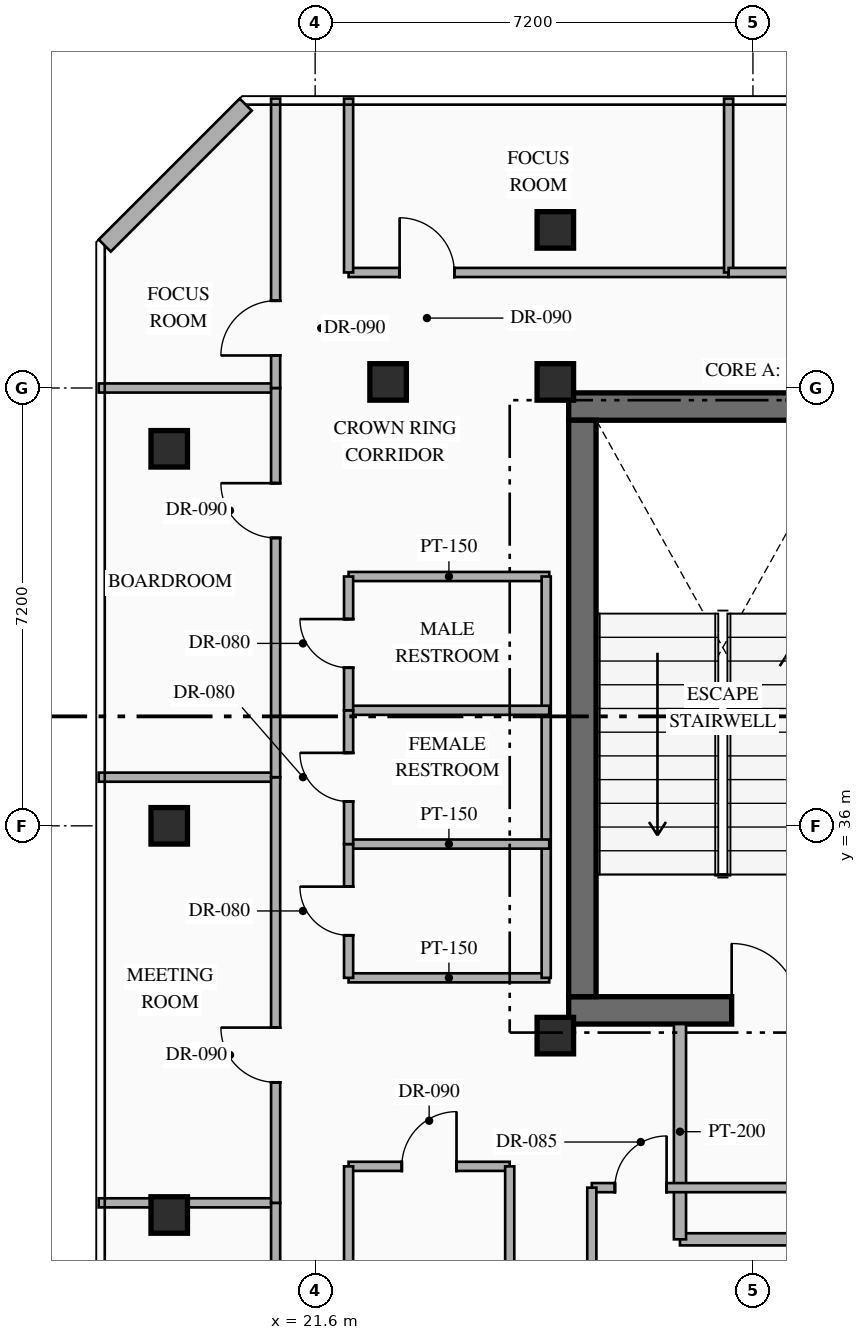
"""IFC4 building model, lengths in metres.
Left out: names, types, materials, properties, quantities, classifications, styles, units other than length and angle.
Written with IfcOpenShell. Run it as: python <this file> out.ifc"""

import sys

from ifc_helpers import new_model, si_unit, direction, frame, frame_2d, origin, origin_2d, place, context, subcontext, project, spatial, rectangle, hollow_rectangle, extrude, element, fill, save


model = new_model("IFC4")
c1 = context("Model", 3, precision=1e-05, world=origin(), true_north=direction((0.0, 1.0)))
c2 = subcontext(c1, "Body", "Model", "MODEL_VIEW")
j1 = project(units=[si_unit("LENGTHUNIT", "METRE"), si_unit("PLANEANGLEUNIT", "RADIAN")], contexts=[c1])
p1 = place(None, origin())
s1 = spatial("IfcSite", under=j1, at=p1, CompositionType="ELEMENT")
p2 = place(p1, origin())
s2 = spatial("IfcBuilding", under=s1, at=p2, CompositionType="ELEMENT")
p3 = place(p2, frame((0.0, 0.0, 269.95)))
s3 = spatial("IfcBuildingStorey", under=s2, at=p3, CompositionType="ELEMENT", Elevation=269.95)
p4 = place(p3, frame((25.77, 32.965, 0.0), z_axis=(0.0, 0.0, 1.0), x_axis=(1.0, 0.0, 0.0)))
e1 = element("IfcWall", 1, at=p4, inside=s3, PredefinedType="SHEAR", context=c2, shape_type="SweptSolid", body=[
    extrude(rectangle(XDim=7.48, YDim=0.45, at=frame_2d((3.74, 0.0))), origin(), (0.0, 0.0, 1.0), 4.0),
])
p5 = place(p4, frame((2.68, 0.0, 0.0)))
e2 = element("IfcOpeningElement", 2, at=p5, cuts=e1, PredefinedType="OPENING", context=c2, shape_type="SweptSolid", body=[
    extrude(rectangle(XDim=1.1, YDim=2.2, at=frame_2d((0.55, 1.1))), frame((0.0, 0.235, 0.0), z_axis=(0.0, -1.0, 0.0), x_axis=(1.0, 0.0, 0.0)), (0.0, 0.0, 1.0), 0.47),
])
p6 = place(p4, frame((5.43, 0.0, 0.0)))
e3 = element("IfcOpeningElement", 3, at=p6, cuts=e1, PredefinedType="OPENING", context=c2, shape_type="SweptSolid", body=[
    extrude(rectangle(XDim=1.1, YDim=2.15, at=frame_2d((0.55, 1.075))), frame((0.0, 0.235, 0.0), z_axis=(0.0, -1.0, 0.0), x_axis=(1.0, 0.0, 0.0)), (0.0, 0.0, 1.0), 0.47),
])
p7 = place(p3, frame((25.77, 42.895, 0.0), z_axis=(0.0, 0.0, 1.0), x_axis=(1.0, 0.0, 0.0)))
e4 = element("IfcWall", 4, at=p7, inside=s3, PredefinedType="SHEAR", context=c2, shape_type="SweptSolid", body=[
    extrude(rectangle(XDim=7.48, YDim=0.45, at=frame_2d((3.74, 0.0))), origin(), (0.0, 0.0, 1.0), 4.0),
])
p8 = place(p3, frame((25.995, 33.19, 0.0), z_axis=(0.0, 0.0, 1.0), x_axis=(0.0, 1.0, 0.0)))
e5 = element("IfcWall", 5, at=p8, inside=s3, PredefinedType="SHEAR", context=c2, shape_type="SweptSolid", body=[
    extrude(rectangle(XDim=9.48, YDim=0.45, at=frame_2d((4.74, 0.0))), origin(), (0.0, 0.0, 1.0), 4.0),
])
for number, where, z_axis, x_axis in (
    (6, (25.55, 32.55, 0.0), (0.0, 0.0, 1.0), (1.0, 0.0, 0.0)),
    (7, (25.55, 43.3, 0.0), (0.0, 0.0, 1.0), (1.0, 0.0, 0.0)),
    (8, (25.55, 45.8, 0.0), (0.0, 0.0, 1.0), (1.0, 0.0, 0.0)),
):
    element("IfcColumn", number, at=place(p3, frame(where, z_axis=z_axis, x_axis=x_axis)), inside=s3, PredefinedType="COLUMN", context=c2, shape_type="SweptSolid", body=[
        extrude(hollow_rectangle(XDim=0.6, YDim=0.6, WallThickness=0.025, at=origin_2d()), origin(), (0.0, 0.0, 1.0), 4.0),
    ])
for number, where, z_axis, x_axis in (
    (9, (19.2, 29.6, 0.0), (0.0, 0.0, 1.0), (1.0, 0.0, 0.0)),
    (10, (19.2, 42.2, 0.0), (0.0, 0.0, 1.0), (1.0, 0.0, 0.0)),
):
    element("IfcColumn", number, at=place(p3, frame(where, z_axis=z_axis, x_axis=x_axis)), inside=s3, PredefinedType="COLUMN", context=c2, shape_type="SweptSolid", body=[
        extrude(hollow_rectangle(XDim=0.6, YDim=0.6, WallThickness=0.025, at=origin_2d()), origin(), (0.0, 0.0, 1.0), 3.718),
    ])
p9 = place(p3, frame((22.8, 43.3, 0.0), z_axis=(0.0, 0.0, 1.0), x_axis=(1.0, 0.0, 0.0)))
e11 = element("IfcColumn", 11, at=p9, inside=s3, PredefinedType="COLUMN", context=c2, shape_type="SweptSolid", body=[
    extrude(hollow_rectangle(XDim=0.6, YDim=0.6, WallThickness=0.025, at=origin_2d()), origin(), (0.0, 0.0, 1.0), 4.0),
])
p10 = place(p3, frame((19.2, 36.0, 0.0), z_axis=(0.0, 0.0, 1.0), x_axis=(1.0, 0.0, 0.0)))
e12 = element("IfcColumn", 12, at=p10, inside=s3, PredefinedType="COLUMN", context=c2, shape_type="SweptSolid", body=[
    extrude(hollow_rectangle(XDim=0.6, YDim=0.6, WallThickness=0.025, at=origin_2d()), origin(), (0.0, 0.0, 1.0), 3.718),
])
p11 = place(p3, frame((18.14, 45.542, 0.0), z_axis=(0.0, 0.0, 1.0), x_axis=(0.707106781187, 0.707106781187, 0.0)))
e13 = element("IfcWall", 13, at=p11, inside=s3, PredefinedType="STANDARD", context=c2, shape_type="SweptSolid", body=[
    extrude(rectangle(XDim=3.278, YDim=0.28, at=frame_2d((1.639, 0.0))), origin(), (0.0, 0.0, 1.0), 3.74),
])
p12 = place(p3, frame((27.6, 29.2, 0.0), z_axis=(0.0, 0.0, 1.0), x_axis=(1.0, 0.0, 0.0)))
e14 = element("IfcWall", 14, at=p12, inside=s3, PredefinedType="STANDARD", context=c2, shape_type="SweptSolid", body=[
    extrude(rectangle(XDim=5.15, YDim=0.2, at=frame_2d((2.575, 0.0))), origin(), (0.0, 0.0, 1.0), 3.74),
])
p13 = place(p3, frame((27.6, 29.2, 0.0), z_axis=(0.0, 0.0, 1.0), x_axis=(0.0, 1.0, 0.0)))
e15 = element("IfcWall", 15, at=p13, inside=s3, PredefinedType="STANDARD", context=c2, shape_type="SweptSolid", body=[
    extrude(rectangle(XDim=3.54, YDim=0.2, at=frame_2d((1.77, 0.0))), origin(), (0.0, 0.0, 1.0), 3.74),
])
for number, where, z_axis, x_axis in (
    (16, (22.15, 33.5, 0.0), (0.0, 0.0, 1.0), (1.0, 0.0, 0.0)),
    (17, (22.15, 40.1, 0.0), (0.0, 0.0, 1.0), (1.0, 0.0, 0.0)),
):
    element("IfcWall", number, at=place(p3, frame(where, z_axis=z_axis, x_axis=x_axis)), inside=s3, PredefinedType="PARTITIONING", context=c2, shape_type="SweptSolid", body=[
        extrude(rectangle(XDim=3.3, YDim=0.15, at=frame_2d((1.65, 0.0))), origin(), (0.0, 0.0, 1.0), 3.74),
    ])
p14 = place(p3, frame((25.4, 33.5, 0.0), z_axis=(0.0, 0.0, 1.0), x_axis=(0.0, 1.0, 0.0)))
e18 = element("IfcWall", 18, at=p14, inside=s3, PredefinedType="PARTITIONING", context=c2, shape_type="SweptSolid", body=[
    extrude(rectangle(XDim=6.6, YDim=0.15, at=frame_2d((3.3, 0.0))), origin(), (0.0, 0.0, 1.0), 3.74),
])
for number, where, z_axis, x_axis in (
    (19, (22.15, 35.7, 0.0), (0.0, 0.0, 1.0), (1.0, 0.0, 0.0)),
    (20, (22.15, 37.9, 0.0), (0.0, 0.0, 1.0), (1.0, 0.0, 0.0)),
):
    element("IfcWall", number, at=place(p3, frame(where, z_axis=z_axis, x_axis=x_axis)), inside=s3, PredefinedType="PARTITIONING", context=c2, shape_type="SweptSolid", body=[
        extrude(rectangle(XDim=3.3, YDim=0.15, at=frame_2d((1.65, 0.0))), origin(), (0.0, 0.0, 1.0), 3.74),
    ])
p15 = place(p3, frame((22.15, 33.5, 0.0), z_axis=(0.0, 0.0, 1.0), x_axis=(0.0, 1.0, 0.0)))
e21 = element("IfcWall", 21, at=p15, inside=s3, PredefinedType="PARTITIONING", context=c2, shape_type="SweptSolid", body=[
    extrude(rectangle(XDim=2.2, YDim=0.15, at=frame_2d((1.1, 0.0))), origin(), (0.0, 0.0, 1.0), 3.74),
])
p16 = place(p15, frame((0.7, 0.0, 0.0)))
e22 = element("IfcOpeningElement", 22, at=p16, cuts=e21, PredefinedType="OPENING", context=c2, shape_type="SweptSolid", body=[
    extrude(rectangle(XDim=0.8, YDim=2.06, at=frame_2d((0.4, 1.03))), frame((0.0, 0.085, 0.0), z_axis=(0.0, -1.0, 0.0), x_axis=(1.0, 0.0, 0.0)), (0.0, 0.0, 1.0), 0.17),
])
p17 = place(p3, frame((22.15, 35.7, 0.0), z_axis=(0.0, 0.0, 1.0), x_axis=(0.0, 1.0, 0.0)))
e23 = element("IfcWall", 23, at=p17, inside=s3, PredefinedType="PARTITIONING", context=c2, shape_type="SweptSolid", body=[
    extrude(rectangle(XDim=2.2, YDim=0.15, at=frame_2d((1.1, 0.0))), origin(), (0.0, 0.0, 1.0), 3.74),
])
p18 = place(p17, frame((0.7, 0.0, 0.0)))
e24 = element("IfcOpeningElement", 24, at=p18, cuts=e23, PredefinedType="OPENING", context=c2, shape_type="SweptSolid", body=[
    extrude(rectangle(XDim=0.8, YDim=2.06, at=frame_2d((0.4, 1.03))), frame((0.0, 0.085, 0.0), z_axis=(0.0, -1.0, 0.0), x_axis=(1.0, 0.0, 0.0)), (0.0, 0.0, 1.0), 0.17),
])
p19 = place(p3, frame((22.15, 37.9, 0.0), z_axis=(0.0, 0.0, 1.0), x_axis=(0.0, 1.0, 0.0)))
e25 = element("IfcWall", 25, at=p19, inside=s3, PredefinedType="PARTITIONING", context=c2, shape_type="SweptSolid", body=[
    extrude(rectangle(XDim=2.2, YDim=0.15, at=frame_2d((1.1, 0.0))), origin(), (0.0, 0.0, 1.0), 3.74),
])
p20 = place(p19, frame((0.7, 0.0, 0.0)))
e26 = element("IfcOpeningElement", 26, at=p20, cuts=e25, PredefinedType="OPENING", context=c2, shape_type="SweptSolid", body=[
    extrude(rectangle(XDim=0.8, YDim=2.06, at=frame_2d((0.4, 1.03))), frame((0.0, 0.085, 0.0), z_axis=(0.0, -1.0, 0.0), x_axis=(1.0, 0.0, 0.0)), (0.0, 0.0, 1.0), 0.17),
])
p21 = place(p3, frame((26.15, 30.05, 0.0), z_axis=(0.0, 0.0, 1.0), x_axis=(1.0, 0.0, 0.0)))
e27 = element("IfcWall", 27, at=p21, inside=s3, PredefinedType="PARTITIONING", context=c2, shape_type="SweptSolid", body=[
    extrude(rectangle(XDim=7.7, YDim=0.15, at=frame_2d((3.85, 0.0))), origin(), (0.0, 0.0, 1.0), 3.74),
])
p22 = place(p21, frame((0.38, 0.0, 0.0)))
e28 = element("IfcOpeningElement", 28, at=p22, cuts=e27, PredefinedType="OPENING", context=c2, shape_type="SweptSolid", body=[
    extrude(rectangle(XDim=0.85, YDim=2.08, at=frame_2d((0.425, 1.04))), frame((0.0, 0.085, 0.0), z_axis=(0.0, -1.0, 0.0), x_axis=(1.0, 0.0, 0.0)), (0.0, 0.0, 1.0), 0.17),
])
p23 = place(p3, frame((26.15, 23.4, 0.0), z_axis=(0.0, 0.0, 1.0), x_axis=(0.0, 1.0, 0.0)))
e29 = element("IfcWall", 29, at=p23, inside=s3, PredefinedType="PARTITIONING", context=c2, shape_type="SweptSolid", body=[
    extrude(rectangle(XDim=6.65, YDim=0.15, at=frame_2d((3.325, 0.0))), origin(), (0.0, 0.0, 1.0), 3.74),
])
p24 = place(p3, frame((22.15, 45.1, 0.0), z_axis=(0.0, 0.0, 1.0), x_axis=(1.0, 0.0, 0.0)))
e30 = element("IfcWall", 30, at=p24, inside=s3, PredefinedType="PARTITIONING", context=c2, shape_type="SweptSolid", body=[
    extrude(rectangle(XDim=6.25, YDim=0.15, at=frame_2d((3.125, 0.0))), origin(), (0.0, 0.0, 1.0), 3.74),
])
p25 = place(p24, frame((0.839, 0.0, 0.0)))
e31 = element("IfcOpeningElement", 31, at=p25, cuts=e30, PredefinedType="OPENING", context=c2, shape_type="SweptSolid", body=[
    extrude(rectangle(XDim=0.9, YDim=2.15, at=frame_2d((0.45, 1.075))), frame((0.0, 0.085, 0.0), z_axis=(0.0, -1.0, 0.0), x_axis=(1.0, 0.0, 0.0)), (0.0, 0.0, 1.0), 0.17),
])
for number, where, z_axis, x_axis in (
    (32, (22.15, 45.1, 0.0), (0.0, 0.0, 1.0), (0.0, 1.0, 0.0)),
    (33, (28.4, 45.1, 0.0), (0.0, 0.0, 1.0), (0.0, 1.0, 0.0)),
):
    element("IfcWall", number, at=place(p3, frame(where, z_axis=z_axis, x_axis=x_axis)), inside=s3, PredefinedType="PARTITIONING", context=c2, shape_type="SweptSolid", body=[
        extrude(rectangle(XDim=2.86, YDim=0.15, at=frame_2d((1.43, 0.0))), origin(), (0.0, 0.0, 1.0), 3.74),
    ])
p26 = place(p3, frame((28.4, 45.1, 0.0), z_axis=(0.0, 0.0, 1.0), x_axis=(1.0, 0.0, 0.0)))
e34 = element("IfcWall", 34, at=p26, inside=s3, PredefinedType="PARTITIONING", context=c2, shape_type="SweptSolid", body=[
    extrude(rectangle(XDim=5.8, YDim=0.15, at=frame_2d((2.9, 0.0))), origin(), (0.0, 0.0, 1.0), 3.74),
])
p27 = place(p26, frame((2.243, 0.0, 0.0)))
e35 = element("IfcOpeningElement", 35, at=p27, cuts=e34, PredefinedType="OPENING", context=c2, shape_type="SweptSolid", body=[
    extrude(rectangle(XDim=0.9, YDim=2.15, at=frame_2d((0.45, 1.075))), frame((0.0, 0.085, 0.0), z_axis=(0.0, -1.0, 0.0), x_axis=(1.0, 0.0, 0.0)), (0.0, 0.0, 1.0), 0.17),
])
p28 = place(p3, frame((18.04, 29.8, 0.0), z_axis=(0.0, 0.0, 1.0), x_axis=(1.0, 0.0, 0.0)))
e36 = element("IfcWall", 36, at=p28, inside=s3, PredefinedType="PARTITIONING", context=c2, shape_type="SweptSolid", body=[
    extrude(rectangle(XDim=2.91, YDim=0.15, at=frame_2d((1.455, 0.0))), origin(), (0.0, 0.0, 1.0), 3.74),
])
p29 = place(p3, frame((20.95, 23.44, 0.0), z_axis=(0.0, 0.0, 1.0), x_axis=(0.0, 1.0, 0.0)))
e37 = element("IfcWall", 37, at=p29, inside=s3, PredefinedType="PARTITIONING", context=c2, shape_type="SweptSolid", body=[
    extrude(rectangle(XDim=6.36, YDim=0.15, at=frame_2d((3.18, 0.0))), origin(), (0.0, 0.0, 1.0), 3.74),
])
p30 = place(p29, frame((2.73, 0.0, 0.0)))
e38 = element("IfcOpeningElement", 38, at=p30, cuts=e37, PredefinedType="OPENING", context=c2, shape_type="SweptSolid", body=[
    extrude(rectangle(XDim=0.9, YDim=2.15, at=frame_2d((0.45, 1.075))), frame((0.0, 0.085, 0.0), z_axis=(0.0, -1.0, 0.0), x_axis=(1.0, 0.0, 0.0)), (0.0, 0.0, 1.0), 0.17),
])
p31 = place(p3, frame((18.04, 36.8, 0.0), z_axis=(0.0, 0.0, 1.0), x_axis=(1.0, 0.0, 0.0)))
e39 = element("IfcWall", 39, at=p31, inside=s3, PredefinedType="PARTITIONING", context=c2, shape_type="SweptSolid", body=[
    extrude(rectangle(XDim=2.91, YDim=0.15, at=frame_2d((1.455, 0.0))), origin(), (0.0, 0.0, 1.0), 3.74),
])
p32 = place(p3, frame((20.95, 29.8, 0.0), z_axis=(0.0, 0.0, 1.0), x_axis=(0.0, 1.0, 0.0)))
e40 = element("IfcWall", 40, at=p32, inside=s3, PredefinedType="PARTITIONING", context=c2, shape_type="SweptSolid", body=[
    extrude(rectangle(XDim=7.0, YDim=0.15, at=frame_2d((3.5, 0.0))), origin(), (0.0, 0.0, 1.0), 3.74),
])
p33 = place(p32, frame((1.982, 0.0, 0.0)))
e41 = element("IfcOpeningElement", 41, at=p33, cuts=e40, PredefinedType="OPENING", context=c2, shape_type="SweptSolid", body=[
    extrude(rectangle(XDim=0.9, YDim=2.15, at=frame_2d((0.45, 1.075))), frame((0.0, 0.085, 0.0), z_axis=(0.0, -1.0, 0.0), x_axis=(1.0, 0.0, 0.0)), (0.0, 0.0, 1.0), 0.17),
])
p34 = place(p3, frame((18.04, 43.2, 0.0), z_axis=(0.0, 0.0, 1.0), x_axis=(1.0, 0.0, 0.0)))
e42 = element("IfcWall", 42, at=p34, inside=s3, PredefinedType="PARTITIONING", context=c2, shape_type="SweptSolid", body=[
    extrude(rectangle(XDim=2.91, YDim=0.15, at=frame_2d((1.455, 0.0))), origin(), (0.0, 0.0, 1.0), 3.74),
])
p35 = place(p3, frame((20.95, 36.8, 0.0), z_axis=(0.0, 0.0, 1.0), x_axis=(0.0, 1.0, 0.0)))
e43 = element("IfcWall", 43, at=p35, inside=s3, PredefinedType="PARTITIONING", context=c2, shape_type="SweptSolid", body=[
    extrude(rectangle(XDim=6.4, YDim=0.15, at=frame_2d((3.2, 0.0))), origin(), (0.0, 0.0, 1.0), 3.74),
])
p36 = place(p35, frame((3.935, 0.0, 0.0)))
e44 = element("IfcOpeningElement", 44, at=p36, cuts=e43, PredefinedType="OPENING", context=c2, shape_type="SweptSolid", body=[
    extrude(rectangle(XDim=0.9, YDim=2.15, at=frame_2d((0.45, 1.075))), frame((0.0, 0.085, 0.0), z_axis=(0.0, -1.0, 0.0), x_axis=(1.0, 0.0, 0.0)), (0.0, 0.0, 1.0), 0.17),
])
p37 = place(p3, frame((20.95, 43.2, 0.0), z_axis=(0.0, 0.0, 1.0), x_axis=(0.0, 1.0, 0.0)))
e45 = element("IfcWall", 45, at=p37, inside=s3, PredefinedType="PARTITIONING", context=c2, shape_type="SweptSolid", body=[
    extrude(rectangle(XDim=4.76, YDim=0.15, at=frame_2d((2.38, 0.0))), origin(), (0.0, 0.0, 1.0), 3.74),
])
p38 = place(p37, frame((0.535, 0.0, 0.0)))
e46 = element("IfcOpeningElement", 46, at=p38, cuts=e45, PredefinedType="OPENING", context=c2, shape_type="SweptSolid", body=[
    extrude(rectangle(XDim=0.9, YDim=2.15, at=frame_2d((0.45, 1.075))), frame((0.0, 0.085, 0.0), z_axis=(0.0, -1.0, 0.0), x_axis=(1.0, 0.0, 0.0)), (0.0, 0.0, 1.0), 0.17),
])
p39 = place(p3, frame((22.15, 30.4, 0.0), z_axis=(0.0, 0.0, 1.0), x_axis=(1.0, 0.0, 0.0)))
e47 = element("IfcWall", 47, at=p39, inside=s3, PredefinedType="PARTITIONING", context=c2, shape_type="SweptSolid", body=[
    extrude(rectangle(XDim=2.65, YDim=0.15, at=frame_2d((1.325, 0.0))), origin(), (0.0, 0.0, 1.0), 3.74),
])
p40 = place(p39, frame((0.875, 0.0, 0.0)))
e48 = element("IfcOpeningElement", 48, at=p40, cuts=e47, PredefinedType="OPENING", context=c2, shape_type="SweptSolid", body=[
    extrude(rectangle(XDim=0.9, YDim=2.15, at=frame_2d((0.45, 1.075))), frame((0.0, 0.085, 0.0), z_axis=(0.0, -1.0, 0.0), x_axis=(1.0, 0.0, 0.0)), (0.0, 0.0, 1.0), 0.17),
])
for number, where, z_axis, x_axis in (
    (49, (22.15, 23.44, 0.0), (0.0, 0.0, 1.0), (0.0, 1.0, 0.0)),
    (50, (24.8, 23.44, 0.0), (0.0, 0.0, 1.0), (0.0, 1.0, 0.0)),
):
    element("IfcWall", number, at=place(p3, frame(where, z_axis=z_axis, x_axis=x_axis)), inside=s3, PredefinedType="PARTITIONING", context=c2, shape_type="SweptSolid", body=[
        extrude(rectangle(XDim=6.96, YDim=0.15, at=frame_2d((3.48, 0.0))), origin(), (0.0, 0.0, 1.0), 3.74),
    ])
p41 = place(p5, origin())
e51 = element("IfcDoor", 51, at=p41, inside=s3, OperationType="SINGLE_SWING_LEFT", PredefinedType="DOOR", context=c2, shape_type="SweptSolid", body=[
    extrude(rectangle(XDim=1.1, YDim=2.2, at=frame_2d((0.55, 1.1))), frame((0.0, 0.025, 0.0), z_axis=(0.0, -1.0, 0.0), x_axis=(1.0, 0.0, 0.0)), (0.0, 0.0, 1.0), 0.05),
])
fill(e2, e51)
p42 = place(p16, origin())
e52 = element("IfcDoor", 52, at=p42, inside=s3, OperationType="SINGLE_SWING_RIGHT", PredefinedType="DOOR", context=c2, shape_type="SweptSolid", body=[
    extrude(rectangle(XDim=0.8, YDim=2.06, at=frame_2d((0.4, 1.03))), frame((0.0, 0.025, 0.0), z_axis=(0.0, -1.0, 0.0), x_axis=(1.0, 0.0, 0.0)), (0.0, 0.0, 1.0), 0.05),
])
fill(e22, e52)
p43 = place(p18, origin())
e53 = element("IfcDoor", 53, at=p43, inside=s3, OperationType="SINGLE_SWING_RIGHT", PredefinedType="DOOR", context=c2, shape_type="SweptSolid", body=[
    extrude(rectangle(XDim=0.8, YDim=2.06, at=frame_2d((0.4, 1.03))), frame((0.0, 0.025, 0.0), z_axis=(0.0, -1.0, 0.0), x_axis=(1.0, 0.0, 0.0)), (0.0, 0.0, 1.0), 0.05),
])
fill(e24, e53)
p44 = place(p20, origin())
e54 = element("IfcDoor", 54, at=p44, inside=s3, OperationType="SINGLE_SWING_RIGHT", PredefinedType="DOOR", context=c2, shape_type="SweptSolid", body=[
    extrude(rectangle(XDim=0.8, YDim=2.06, at=frame_2d((0.4, 1.03))), frame((0.0, 0.025, 0.0), z_axis=(0.0, -1.0, 0.0), x_axis=(1.0, 0.0, 0.0)), (0.0, 0.0, 1.0), 0.05),
])
fill(e26, e54)
p45 = place(p22, origin())
e55 = element("IfcDoor", 55, at=p45, inside=s3, OperationType="SINGLE_SWING_RIGHT", PredefinedType="DOOR", context=c2, shape_type="SweptSolid", body=[
    extrude(rectangle(XDim=0.85, YDim=2.08, at=frame_2d((0.425, 1.04))), frame((0.0, 0.025, 0.0), z_axis=(0.0, -1.0, 0.0), x_axis=(1.0, 0.0, 0.0)), (0.0, 0.0, 1.0), 0.05),
])
fill(e28, e55)
p46 = place(p25, origin())
e56 = element("IfcDoor", 56, at=p46, inside=s3, OperationType="SINGLE_SWING_LEFT", PredefinedType="DOOR", context=c2, shape_type="SweptSolid", body=[
    extrude(rectangle(XDim=0.9, YDim=2.15, at=frame_2d((0.45, 1.075))), frame((0.0, 0.025, 0.0), z_axis=(0.0, -1.0, 0.0), x_axis=(1.0, 0.0, 0.0)), (0.0, 0.0, 1.0), 0.05),
])
fill(e31, e56)
p47 = place(p33, origin())
e57 = element("IfcDoor", 57, at=p47, inside=s3, OperationType="SINGLE_SWING_RIGHT", PredefinedType="DOOR", context=c2, shape_type="SweptSolid", body=[
    extrude(rectangle(XDim=0.9, YDim=2.15, at=frame_2d((0.45, 1.075))), frame((0.0, 0.025, 0.0), z_axis=(0.0, -1.0, 0.0), x_axis=(1.0, 0.0, 0.0)), (0.0, 0.0, 1.0), 0.05),
])
fill(e41, e57)
p48 = place(p36, origin())
e58 = element("IfcDoor", 58, at=p48, inside=s3, OperationType="SINGLE_SWING_RIGHT", PredefinedType="DOOR", context=c2, shape_type="SweptSolid", body=[
    extrude(rectangle(XDim=0.9, YDim=2.15, at=frame_2d((0.45, 1.075))), frame((0.0, 0.025, 0.0), z_axis=(0.0, -1.0, 0.0), x_axis=(1.0, 0.0, 0.0)), (0.0, 0.0, 1.0), 0.05),
])
fill(e44, e58)
p49 = place(p38, origin())
e59 = element("IfcDoor", 59, at=p49, inside=s3, OperationType="SINGLE_SWING_LEFT", PredefinedType="DOOR", context=c2, shape_type="SweptSolid", body=[
    extrude(rectangle(XDim=0.9, YDim=2.15, at=frame_2d((0.45, 1.075))), frame((0.0, 0.025, 0.0), z_axis=(0.0, -1.0, 0.0), x_axis=(1.0, 0.0, 0.0)), (0.0, 0.0, 1.0), 0.05),
])
fill(e46, e59)
p50 = place(p40, origin())
e60 = element("IfcDoor", 60, at=p50, inside=s3, OperationType="SINGLE_SWING_RIGHT", PredefinedType="DOOR", context=c2, shape_type="SweptSolid", body=[
    extrude(rectangle(XDim=0.9, YDim=2.15, at=frame_2d((0.45, 1.075))), frame((0.0, 0.025, 0.0), z_axis=(0.0, -1.0, 0.0), x_axis=(1.0, 0.0, 0.0)), (0.0, 0.0, 1.0), 0.05),
])
fill(e48, e60)
save(model, sys.argv[1])
